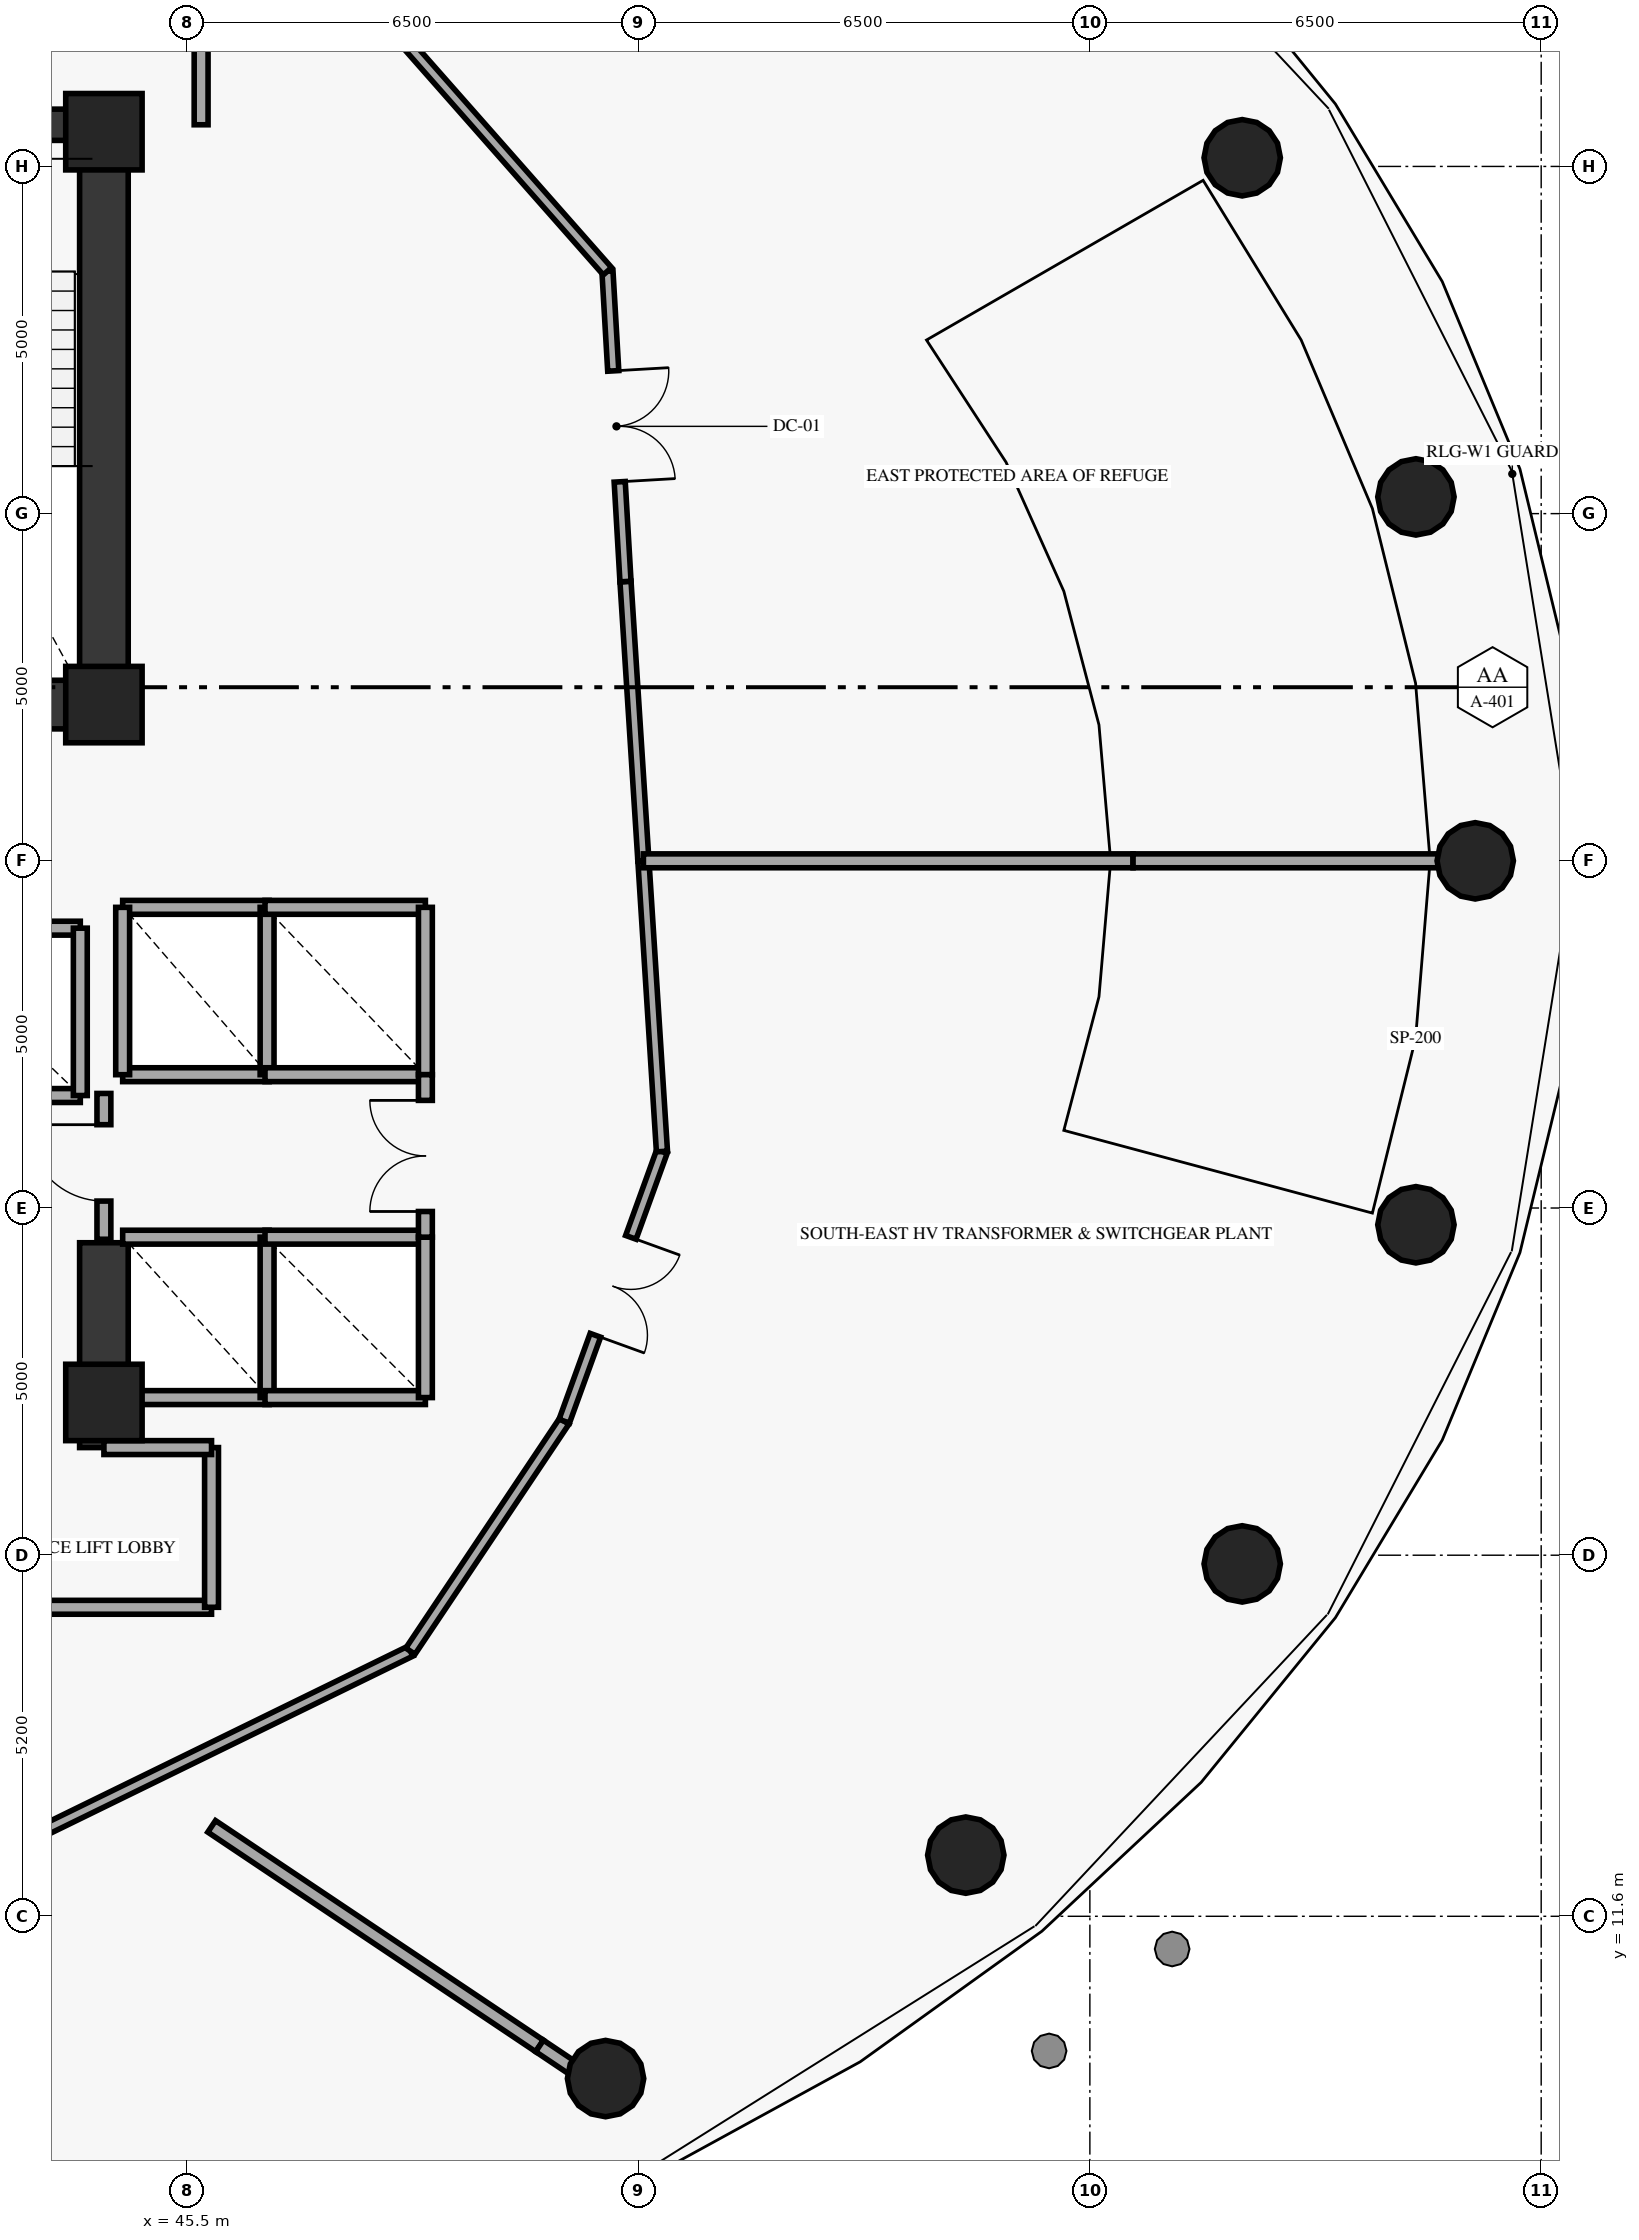
"""IFC4 building model, lengths in metres.
Left out: names, types, materials, properties, quantities, classifications, styles, units other than length and angle.
Written with IfcOpenShell. Run it as: python <this file> out.ifc"""

import sys

from ifc_helpers import new_model, si_unit, direction, frame, frame_2d, origin, origin_2d, place, context, subcontext, project, spatial, rectangle, circle, extrude, element, fill, save


model = new_model("IFC4")
c1 = context("Model", 3, precision=1e-05, world=origin(), true_north=direction((0.0, 1.0)))
c2 = subcontext(c1, "Body", "Model", "MODEL_VIEW")
j1 = project(units=[si_unit("LENGTHUNIT", "METRE"), si_unit("PLANEANGLEUNIT", "RADIAN")], contexts=[c1])
p1 = place(None, origin())
s1 = spatial("IfcSite", under=j1, at=p1, CompositionType="ELEMENT")
p2 = place(p1, origin())
s2 = spatial("IfcBuilding", under=s1, at=p2, CompositionType="ELEMENT")
p3 = place(p2, frame((0.0, 0.0, 106.05)))
s3 = spatial("IfcBuildingStorey", under=s2, at=p3, CompositionType="ELEMENT", Elevation=106.05)
for number, where, z_axis, x_axis in (
    (1, (44.3, 19.0, 0.0), (0.0, 0.0, 1.0), (1.0, 0.0, 0.0)),
    (2, (44.3, 29.05, 0.0), (0.0, 0.0, 1.0), (1.0, 0.0, 0.0)),
    (3, (44.3, 37.3, 0.0), (0.0, 0.0, 1.0), (1.0, 0.0, 0.0)),
):
    element("IfcColumn", number, at=place(p3, frame(where, z_axis=z_axis, x_axis=x_axis)), inside=s3, PredefinedType="PILASTER", context=c2, shape_type="SweptSolid", body=[
        extrude(rectangle(XDim=1.1, YDim=1.1, at=origin_2d()), origin(), (0.0, 0.0, 1.0), 6.88),
    ])
for number, where, z_axis, x_axis in (
    (4, (64.05, 26.8, 0.0), (0.0, 0.0, 1.0), (1.0, 0.0, 0.0)),
    (5, (63.196, 32.041, 0.0), (0.0, 0.0, 1.0), (1.0, 0.0, 0.0)),
    (6, (60.694, 36.925, 0.0), (0.0, 0.0, 1.0), (1.0, 0.0, 0.0)),
    (7, (51.525, 9.263, 0.0), (0.0, 0.0, 1.0), (1.0, 0.0, 0.0)),
    (8, (56.713, 12.481, 0.0), (0.0, 0.0, 1.0), (1.0, 0.0, 0.0)),
    (9, (60.694, 16.675, 0.0), (0.0, 0.0, 1.0), (1.0, 0.0, 0.0)),
    (10, (63.196, 21.559, 0.0), (0.0, 0.0, 1.0), (1.0, 0.0, 0.0)),
):
    element("IfcColumn", number, at=place(p3, frame(where, z_axis=z_axis, x_axis=x_axis)), inside=s3, PredefinedType="COLUMN", context=c2, shape_type="SweptSolid", body=[
        extrude(circle(Radius=0.55, at=origin_2d()), origin(), (0.0, 0.0, 1.0), 6.88),
    ])
p4 = place(p3, frame((44.3, 29.05, 0.0), z_axis=(0.0, 0.0, 1.0), x_axis=(0.0, 1.0, 0.0)))
e11 = element("IfcWall", 11, at=p4, inside=s3, PredefinedType="SHEAR", context=c2, shape_type="SweptSolid", body=[
    extrude(rectangle(XDim=8.35, YDim=0.7, at=frame_2d((4.175, 0.0))), origin(), (0.0, 0.0, 1.0), 6.88),
])
p5 = place(p3, frame((44.3, 18.35, 0.0), z_axis=(0.0, 0.0, 1.0), x_axis=(0.0, 1.0, 0.0)))
e12 = element("IfcWall", 12, at=p5, inside=s3, PredefinedType="SHEAR", context=c2, shape_type="SweptSolid", body=[
    extrude(rectangle(XDim=2.95, YDim=0.7, at=frame_2d((1.475, 0.0))), origin(), (0.0, 0.0, 1.0), 6.88),
])
p6 = place(p3, frame((33.7, 29.05, 0.0), z_axis=(0.0, 0.0, 1.0), x_axis=(1.0, 0.0, 0.0)))
e13 = element("IfcWall", 13, at=p6, inside=s3, PredefinedType="SHEAR", context=c2, shape_type="SweptSolid", body=[
    extrude(rectangle(XDim=10.6, YDim=0.7, at=frame_2d((5.3, 0.0))), origin(), (0.0, 0.0, 1.0), 6.88),
])
p7 = place(p3, frame((44.3, 37.4, 0.0), z_axis=(0.0, 0.0, 1.0), x_axis=(-1.0, 0.0, 0.0)))
e14 = element("IfcWall", 14, at=p7, inside=s3, PredefinedType="SHEAR", context=c2, shape_type="SweptSolid", body=[
    extrude(rectangle(XDim=3.65, YDim=0.45, at=frame_2d((1.825, 0.0))), origin(), (0.0, 0.0, 1.0), 6.88),
])
p8 = place(p7, frame((1.25, 0.0, 0.0)))
e15 = element("IfcOpeningElement", 15, at=p8, cuts=e14, PredefinedType="OPENING", context=c2, shape_type="SweptSolid", body=[
    extrude(rectangle(XDim=1.15, YDim=2.15, at=frame_2d((0.575, 1.075))), frame((0.0, 0.235, 0.0), z_axis=(0.0, -1.0, 0.0), x_axis=(1.0, 0.0, 0.0)), (0.0, 0.0, 1.0), 0.47),
])
p9 = place(p3, frame((45.7, 37.4, 0.0), z_axis=(0.0, 0.0, 1.0), x_axis=(0.0, 1.0, 0.0)))
e16 = element("IfcWall", 16, at=p9, inside=s3, PredefinedType="SOLIDWALL", context=c2, shape_type="SweptSolid", body=[
    extrude(rectangle(XDim=1.88, YDim=0.2, at=frame_2d((0.94, 0.0))), origin(), (0.0, 0.0, 1.0), 6.88),
])
for number, where, z_axis, x_axis in (
    (17, (44.57, 23.72, 0.0), (0.0, 0.0, 1.0), (1.0, 0.0, 0.0)),
    (18, (44.57, 26.13, 0.0), (0.0, 0.0, 1.0), (1.0, 0.0, 0.0)),
):
    element("IfcWall", number, at=place(p3, frame(where, z_axis=z_axis, x_axis=x_axis)), inside=s3, PredefinedType="SOLIDWALL", context=c2, shape_type="SweptSolid", body=[
        extrude(rectangle(XDim=2.11, YDim=0.2, at=frame_2d((1.055, 0.0))), origin(), (0.0, 0.0, 1.0), 6.88),
    ])
for number, where, z_axis, x_axis in (
    (19, (44.57, 23.72, 0.0), (0.0, 0.0, 1.0), (0.0, 1.0, 0.0)),
    (20, (46.65, 23.72, 0.0), (0.0, 0.0, 1.0), (0.0, 1.0, 0.0)),
):
    element("IfcWall", number, at=place(p3, frame(where, z_axis=z_axis, x_axis=x_axis)), inside=s3, PredefinedType="SOLIDWALL", context=c2, shape_type="SweptSolid", body=[
        extrude(rectangle(XDim=2.41, YDim=0.2, at=frame_2d((1.205, 0.0))), origin(), (0.0, 0.0, 1.0), 6.88),
    ])
for number, where, z_axis, x_axis in (
    (21, (46.62, 23.72, 0.0), (0.0, 0.0, 1.0), (1.0, 0.0, 0.0)),
    (22, (46.62, 26.13, 0.0), (0.0, 0.0, 1.0), (1.0, 0.0, 0.0)),
):
    element("IfcWall", number, at=place(p3, frame(where, z_axis=z_axis, x_axis=x_axis)), inside=s3, PredefinedType="SOLIDWALL", context=c2, shape_type="SweptSolid", body=[
        extrude(rectangle(XDim=2.31, YDim=0.2, at=frame_2d((1.155, 0.0))), origin(), (0.0, 0.0, 1.0), 6.88),
    ])
p10 = place(p3, frame((48.93, 23.72, 0.0), z_axis=(0.0, 0.0, 1.0), x_axis=(0.0, 1.0, 0.0)))
e23 = element("IfcWall", 23, at=p10, inside=s3, PredefinedType="SOLIDWALL", context=c2, shape_type="SweptSolid", body=[
    extrude(rectangle(XDim=2.41, YDim=0.2, at=frame_2d((1.205, 0.0))), origin(), (0.0, 0.0, 1.0), 6.88),
])
for number, where, z_axis, x_axis in (
    (24, (44.57, 19.07, 0.0), (0.0, 0.0, 1.0), (1.0, 0.0, 0.0)),
    (25, (44.57, 21.38, 0.0), (0.0, 0.0, 1.0), (1.0, 0.0, 0.0)),
):
    element("IfcWall", number, at=place(p3, frame(where, z_axis=z_axis, x_axis=x_axis)), inside=s3, PredefinedType="SOLIDWALL", context=c2, shape_type="SweptSolid", body=[
        extrude(rectangle(XDim=2.11, YDim=0.2, at=frame_2d((1.055, 0.0))), origin(), (0.0, 0.0, 1.0), 6.88),
    ])
for number, where, z_axis, x_axis in (
    (26, (46.65, 19.07, 0.0), (0.0, 0.0, 1.0), (0.0, 1.0, 0.0)),
    (27, (46.62, 19.07, 0.0), (0.0, 0.0, 1.0), (1.0, 0.0, 0.0)),
    (28, (46.62, 21.38, 0.0), (0.0, 0.0, 1.0), (1.0, 0.0, 0.0)),
    (29, (48.93, 19.07, 0.0), (0.0, 0.0, 1.0), (0.0, 1.0, 0.0)),
):
    element("IfcWall", number, at=place(p3, frame(where, z_axis=z_axis, x_axis=x_axis)), inside=s3, PredefinedType="SOLIDWALL", context=c2, shape_type="SweptSolid", body=[
        extrude(rectangle(XDim=2.31, YDim=0.2, at=frame_2d((1.155, 0.0))), origin(), (0.0, 0.0, 1.0), 6.88),
    ])
for number, where, z_axis, x_axis in (
    (30, (41.46, 23.42, 0.0), (0.0, 0.0, 1.0), (1.0, 0.0, 0.0)),
    (31, (41.46, 25.83, 0.0), (0.0, 0.0, 1.0), (1.0, 0.0, 0.0)),
):
    element("IfcWall", number, at=place(p3, frame(where, z_axis=z_axis, x_axis=x_axis)), inside=s3, PredefinedType="SOLIDWALL", context=c2, shape_type="SweptSolid", body=[
        extrude(rectangle(XDim=2.5, YDim=0.2, at=frame_2d((1.25, 0.0))), origin(), (0.0, 0.0, 1.0), 6.88),
    ])
p11 = place(p3, frame((43.96, 23.42, 0.0), z_axis=(0.0, 0.0, 1.0), x_axis=(0.0, 1.0, 0.0)))
e32 = element("IfcWall", 32, at=p11, inside=s3, PredefinedType="SOLIDWALL", context=c2, shape_type="SweptSolid", body=[
    extrude(rectangle(XDim=2.41, YDim=0.2, at=frame_2d((1.205, 0.0))), origin(), (0.0, 0.0, 1.0), 6.88),
])
p12 = place(p3, frame((48.93, 21.38, 0.0), z_axis=(0.0, 0.0, 1.0), x_axis=(0.0, 1.0, 0.0)))
e33 = element("IfcWall", 33, at=p12, inside=s3, PredefinedType="SOLIDWALL", context=c2, shape_type="SweptSolid", body=[
    extrude(rectangle(XDim=2.34, YDim=0.2, at=frame_2d((1.17, 0.0))), origin(), (0.0, 0.0, 1.0), 6.88),
])
p13 = place(p12, frame((0.37, 0.0, 0.0)))
e34 = element("IfcOpeningElement", 34, at=p13, cuts=e33, PredefinedType="OPENING", context=c2, shape_type="SweptSolid", body=[
    extrude(rectangle(XDim=1.6, YDim=2.2, at=frame_2d((0.8, 1.1))), frame((0.0, 0.11, 0.0), z_axis=(0.0, -1.0, 0.0), x_axis=(1.0, 0.0, 0.0)), (0.0, 0.0, 1.0), 0.22),
])
p14 = place(p3, frame((44.3, 21.35, 0.0), z_axis=(0.0, 0.0, 1.0), x_axis=(0.0, 1.0, 0.0)))
e35 = element("IfcWall", 35, at=p14, inside=s3, PredefinedType="SOLIDWALL", context=c2, shape_type="SweptSolid", body=[
    extrude(rectangle(XDim=2.1, YDim=0.2, at=frame_2d((1.05, 0.0))), origin(), (0.0, 0.0, 1.0), 6.265),
])
p15 = place(p14, frame((0.55, 0.0, 0.0)))
e36 = element("IfcOpeningElement", 36, at=p15, cuts=e35, PredefinedType="OPENING", context=c2, shape_type="SweptSolid", body=[
    extrude(rectangle(XDim=1.1, YDim=2.15, at=frame_2d((0.55, 1.075))), frame((0.0, 0.11, 0.0), z_axis=(0.0, -1.0, 0.0), x_axis=(1.0, 0.0, 0.0)), (0.0, 0.0, 1.0), 0.22),
])
p16 = place(p3, frame((41.35, 16.05, 0.0), z_axis=(0.0, 0.0, 1.0), x_axis=(1.0, 0.0, 0.0)))
e37 = element("IfcWall", 37, at=p16, inside=s3, PredefinedType="SOLIDWALL", context=c2, shape_type="SweptSolid", body=[
    extrude(rectangle(XDim=4.5, YDim=0.2, at=frame_2d((2.25, 0.0))), origin(), (0.0, 0.0, 1.0), 6.88),
])
p17 = place(p3, frame((45.85, 16.05, 0.0), z_axis=(0.0, 0.0, 1.0), x_axis=(0.0, 1.0, 0.0)))
e38 = element("IfcWall", 38, at=p17, inside=s3, PredefinedType="SOLIDWALL", context=c2, shape_type="SweptSolid", body=[
    extrude(rectangle(XDim=2.3, YDim=0.2, at=frame_2d((1.15, 0.0))), origin(), (0.0, 0.0, 1.0), 6.88),
])
p18 = place(p3, frame((44.3, 18.35, 0.0), z_axis=(0.0, 0.0, 1.0), x_axis=(1.0, 0.0, 0.0)))
e39 = element("IfcWall", 39, at=p18, inside=s3, PredefinedType="SOLIDWALL", context=c2, shape_type="SweptSolid", body=[
    extrude(rectangle(XDim=1.55, YDim=0.2, at=frame_2d((0.775, 0.0))), origin(), (0.0, 0.0, 1.0), 6.88),
])
p19 = place(p3, frame((52.07, 26.8, 0.0), z_axis=(0.0, 0.0, 1.0), x_axis=(-0.064030047677, 0.997947971086, 0.0)))
e40 = element("IfcWall", 40, at=p19, inside=s3, PredefinedType="PARTITIONING", context=c2, shape_type="SweptSolid", body=[
    extrude(rectangle(XDim=4.03, YDim=0.16, at=frame_2d((2.015, 0.0))), origin(), (0.0, 0.0, 1.0), 6.88),
])
p20 = place(p3, frame((51.552, 35.291, 0.0), z_axis=(0.0, 0.0, 1.0), x_axis=(0.058082602913, -0.998311780577, 0.0)))
e41 = element("IfcWall", 41, at=p20, inside=s3, PredefinedType="PARTITIONING", context=c2, shape_type="SweptSolid", body=[
    extrude(rectangle(XDim=4.477, YDim=0.16, at=frame_2d((2.238, 0.0))), origin(), (0.0, 0.0, 1.0), 6.88),
])
p21 = place(p20, frame((1.438, 0.0, 0.0)))
e42 = element("IfcOpeningElement", 42, at=p21, cuts=e41, PredefinedType="OPENING", context=c2, shape_type="SweptSolid", body=[
    extrude(rectangle(XDim=1.6, YDim=2.2, at=frame_2d((0.8, 1.1))), frame((0.0, 0.09, 0.0), z_axis=(0.0, -1.0, 0.0), x_axis=(1.0, 0.0, 0.0)), (0.0, 0.0, 1.0), 0.18),
])
p22 = place(p3, frame((51.552, 35.291, 0.0), z_axis=(0.0, 0.0, 1.0), x_axis=(-0.661421630005, 0.750014284772, 0.0)))
e43 = element("IfcWall", 43, at=p22, inside=s3, PredefinedType="PARTITIONING", context=c2, shape_type="SweptSolid", body=[
    extrude(rectangle(XDim=8.116, YDim=0.16, at=frame_2d((4.058, 0.0))), origin(), (0.0, 0.0, 1.0), 6.88),
])
p23 = place(p3, frame((42.318, 12.292, 0.0), z_axis=(0.0, 0.0, 1.0), x_axis=(0.898437278598, 0.439101874768, 0.0)))
e44 = element("IfcWall", 44, at=p23, inside=s3, PredefinedType="PARTITIONING", context=c2, shape_type="SweptSolid", body=[
    extrude(rectangle(XDim=7.119, YDim=0.16, at=frame_2d((3.56, 0.0))), origin(), (0.0, 0.0, 1.0), 6.88),
])
p24 = place(p3, frame((48.714, 15.418, 0.0), z_axis=(0.0, 0.0, 1.0), x_axis=(0.556056751682, 0.831144324958, 0.0)))
e45 = element("IfcWall", 45, at=p24, inside=s3, PredefinedType="PARTITIONING", context=c2, shape_type="SweptSolid", body=[
    extrude(rectangle(XDim=3.985, YDim=0.16, at=frame_2d((1.992, 0.0))), origin(), (0.0, 0.0, 1.0), 6.88),
])
p25 = place(p3, frame((52.337, 22.614, 0.0), z_axis=(0.0, 0.0, 1.0), x_axis=(-0.34058972089, -0.940212019719, 0.0)))
e46 = element("IfcWall", 46, at=p25, inside=s3, PredefinedType="PARTITIONING", context=c2, shape_type="SweptSolid", body=[
    extrude(rectangle(XDim=4.131, YDim=0.16, at=frame_2d((2.065, 0.0))), origin(), (0.0, 0.0, 1.0), 6.88),
])
p26 = place(p25, frame((1.315, 0.0, 0.0)))
e47 = element("IfcOpeningElement", 47, at=p26, cuts=e46, PredefinedType="OPENING", context=c2, shape_type="SweptSolid", body=[
    extrude(rectangle(XDim=1.5, YDim=2.2, at=frame_2d((0.75, 1.1))), frame((0.0, 0.09, 0.0), z_axis=(0.0, -1.0, 0.0), x_axis=(1.0, 0.0, 0.0)), (0.0, 0.0, 1.0), 0.18),
])
p27 = place(p3, frame((52.337, 22.614, 0.0), z_axis=(0.0, 0.0, 1.0), x_axis=(-0.063617518313, 0.997974354061, 0.0)))
e48 = element("IfcWall", 48, at=p27, inside=s3, PredefinedType="PARTITIONING", context=c2, shape_type="SweptSolid", body=[
    extrude(rectangle(XDim=4.195, YDim=0.16, at=frame_2d((2.097, 0.0))), origin(), (0.0, 0.0, 1.0), 6.88),
])
p28 = place(p3, frame((52.07, 26.8, 0.0), z_axis=(0.0, 0.0, 1.0), x_axis=(1.0, 0.0, 0.0)))
e49 = element("IfcWall", 49, at=p28, inside=s3, PredefinedType="SOLIDWALL", context=c2, shape_type="SweptSolid", body=[
    extrude(rectangle(XDim=7.052, YDim=0.2, at=frame_2d((3.526, 0.0))), origin(), (0.0, 0.0, 1.0), 6.88),
])
p29 = place(p3, frame((59.122, 26.8, 0.0), z_axis=(0.0, 0.0, 1.0), x_axis=(1.0, 0.0, 0.0)))
e50 = element("IfcWall", 50, at=p29, inside=s3, PredefinedType="SOLIDWALL", context=c2, shape_type="SweptSolid", body=[
    extrude(rectangle(XDim=5.243, YDim=0.2, at=frame_2d((2.622, 0.0))), origin(), (0.0, 0.0, 1.0), 4.88),
])
p30 = place(p3, frame((45.852, 12.895, 0.0), z_axis=(0.0, 0.0, 1.0), x_axis=(0.830898487363, -0.55642403228, 0.0)))
e51 = element("IfcWall", 51, at=p30, inside=s3, PredefinedType="SOLIDWALL", context=c2, shape_type="SweptSolid", body=[
    extrude(rectangle(XDim=5.683, YDim=0.2, at=frame_2d((2.841, 0.0))), origin(), (0.0, 0.0, 1.0), 6.88),
])
p31 = place(p3, frame((50.574, 9.733, 0.0), z_axis=(0.0, 0.0, 1.0), x_axis=(0.830838472421, -0.556513641113, 0.0)))
e52 = element("IfcWall", 52, at=p31, inside=s3, PredefinedType="SOLIDWALL", context=c2, shape_type="SweptSolid", body=[
    extrude(rectangle(XDim=1.335, YDim=0.2, at=frame_2d((0.667, 0.0))), origin(), (0.0, 0.0, 1.0), 5.53),
])
p32 = place(p13, origin())
e53 = element("IfcDoor", 53, at=p32, inside=s3, OperationType="DOUBLE_DOOR_SINGLE_SWING", PredefinedType="DOOR", context=c2, shape_type="SweptSolid", body=[
    extrude(rectangle(XDim=1.6, YDim=2.2, at=frame_2d((0.8, 1.1))), frame((0.0, 0.025, 0.0), z_axis=(0.0, -1.0, 0.0), x_axis=(1.0, 0.0, 0.0)), (0.0, 0.0, 1.0), 0.05),
])
fill(e34, e53)
p33 = place(p15, origin())
e54 = element("IfcDoor", 54, at=p33, inside=s3, OperationType="SINGLE_SWING_RIGHT", PredefinedType="DOOR", context=c2, shape_type="SweptSolid", body=[
    extrude(rectangle(XDim=1.1, YDim=2.15, at=frame_2d((0.55, 1.075))), frame((0.0, 0.025, 0.0), z_axis=(0.0, -1.0, 0.0), x_axis=(1.0, 0.0, 0.0)), (0.0, 0.0, 1.0), 0.05),
])
fill(e36, e54)
p34 = place(p21, origin())
e55 = element("IfcDoor", 55, at=p34, inside=s3, OperationType="DOUBLE_DOOR_SINGLE_SWING", PredefinedType="DOOR", context=c2, shape_type="SweptSolid", body=[
    extrude(rectangle(XDim=1.6, YDim=2.2, at=frame_2d((0.8, 1.1))), frame((0.0, 0.025, 0.0), z_axis=(0.0, -1.0, 0.0), x_axis=(1.0, 0.0, 0.0)), (0.0, 0.0, 1.0), 0.05),
])
fill(e42, e55)
p35 = place(p26, origin())
e56 = element("IfcDoor", 56, at=p35, inside=s3, OperationType="DOUBLE_DOOR_SINGLE_SWING", PredefinedType="DOOR", context=c2, shape_type="SweptSolid", body=[
    extrude(rectangle(XDim=1.5, YDim=2.2, at=frame_2d((0.75, 1.1))), frame((0.0, 0.025, 0.0), z_axis=(0.0, -1.0, 0.0), x_axis=(1.0, 0.0, 0.0)), (0.0, 0.0, 1.0), 0.05),
])
fill(e47, e56)
save(model, sys.argv[1])
